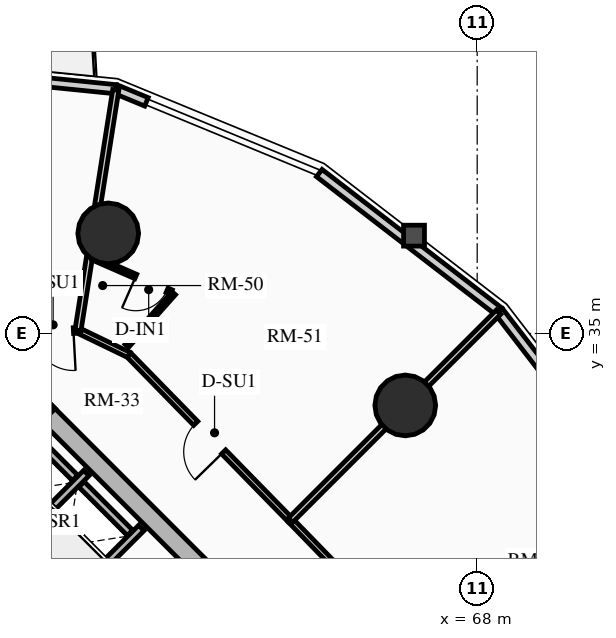
"""IFC4 building model, lengths in metres.
Left out: names, types, materials, properties, quantities, classifications, styles, units other than length and angle.
Written with IfcOpenShell. Run it as: python <this file> out.ifc"""

import sys

from ifc_helpers import new_model, si_unit, direction, frame, frame_2d, origin, origin_2d, place, context, subcontext, project, spatial, rectangle, circle, extrude, source, transform, mapped, element, fill, save


model = new_model("IFC4")
c1 = context("Model", 3, precision=1e-05, world=origin(), true_north=direction((0.0, 1.0)))
c2 = subcontext(c1, "Body", "Model", "MODEL_VIEW")
j1 = project(units=[si_unit("LENGTHUNIT", "METRE"), si_unit("PLANEANGLEUNIT", "RADIAN")], contexts=[c1])
p1 = place(None, origin())
s1 = spatial("IfcSite", under=j1, at=p1, CompositionType="ELEMENT")
p2 = place(p1, origin())
s2 = spatial("IfcBuilding", under=s1, at=p2, CompositionType="ELEMENT")
p3 = place(p2, frame((0.0, 0.0, 51.1)))
s3 = spatial("IfcBuildingStorey", under=s2, at=p3, CompositionType="ELEMENT", Elevation=51.1)
p4 = place(p3, frame((66.339, 23.227, 0.0), z_axis=(0.0, 0.0, 1.0), x_axis=(-0.707106781187, 0.707106781187, 0.0)))
e1 = element("IfcWall", 1, at=p4, inside=s3, PredefinedType="SHEAR", context=c2, shape_type="SweptSolid", body=[
    extrude(rectangle(XDim=14.3, YDim=0.5, at=frame_2d((7.15, 0.0))), origin(), (0.0, 0.0, 1.0), 2.91),
])
p5 = place(p3, frame((63.662, 20.904, 0.0), z_axis=(0.0, 0.0, 1.0), x_axis=(-0.707106781187, 0.707106781187, 0.0)))
e2 = element("IfcWall", 2, at=p5, inside=s3, PredefinedType="SHEAR", context=c2, shape_type="SweptSolid", body=[
    extrude(rectangle(XDim=13.8, YDim=0.35, at=frame_2d((6.9, 0.0))), origin(), (0.0, 0.0, 1.0), 2.91),
])
m1 = source(origin(), c2, "Body", "SweptSolid", [
    extrude(rectangle(XDim=1.1, YDim=2.015, at=frame_2d((0.55, 1.007))), frame((0.0, 0.185, 0.0), z_axis=(0.0, -1.0, 0.0), x_axis=(1.0, 0.0, 0.0)), (0.0, 0.0, 1.0), 0.37),
])
p6 = place(p5, frame((10.025, 0.0, 0.0)))
e3 = element("IfcOpeningElement", 3, at=p6, cuts=e2, PredefinedType="OPENING", context=c2, shape_type="MappedRepresentation", body=[
    mapped(m1, transform((0.0, 0.0, 0.0), x_axis=(1.0, 0.0, 0.0), y_axis=(0.0, 1.0, 0.0), z_axis=(0.0, 0.0, 1.0), scale=1.0)),
])
p7 = place(p5, frame((12.025, 0.0, 0.0)))
e4 = element("IfcOpeningElement", 4, at=p7, cuts=e2, PredefinedType="OPENING", context=c2, shape_type="MappedRepresentation", body=[
    mapped(m1, transform((0.0, 0.0, 0.0), x_axis=(1.0, 0.0, 0.0), y_axis=(0.0, 1.0, 0.0), z_axis=(0.0, 0.0, 1.0), scale=1.0)),
])
m2 = source(origin(), c2, "Body", "SweptSolid", [
    extrude(rectangle(XDim=1.15, YDim=2.02, at=frame_2d((0.575, 1.01))), frame((0.0, 0.185, 0.0), z_axis=(0.0, -1.0, 0.0), x_axis=(1.0, 0.0, 0.0)), (0.0, 0.0, 1.0), 0.37),
])
p8 = place(p5, frame((5.33, 0.0, 0.0)))
e5 = element("IfcOpeningElement", 5, at=p8, cuts=e2, PredefinedType="OPENING", context=c2, shape_type="MappedRepresentation", body=[
    mapped(m2, transform((0.0, 0.0, 0.0), x_axis=(1.0, 0.0, 0.0), y_axis=(0.0, 1.0, 0.0), z_axis=(0.0, 0.0, 1.0), scale=1.0)),
])
p9 = place(p3, frame((56.294, 33.024, 0.0), z_axis=(0.0, 0.0, 1.0), x_axis=(0.707106781187, 0.707106781187, 0.0)))
e6 = element("IfcColumn", 6, at=p9, inside=s3, PredefinedType="COLUMN", context=c2, shape_type="SweptSolid", body=[
    extrude(rectangle(XDim=0.85, YDim=0.85, at=origin_2d()), origin(), (0.0, 0.0, 1.0), 2.91),
])
for number, where, z_axis, x_axis in (
    (7, (66.107, 33.107, 0.0), (0.0, 0.0, 1.0), (1.0, 0.0, 0.0)),
    (8, (58.291, 37.635, 0.0), (0.0, 0.0, 1.0), (1.0, 0.0, 0.0)),
):
    element("IfcColumn", number, at=place(p3, frame(where, z_axis=z_axis, x_axis=x_axis)), inside=s3, PredefinedType="USERDEFINED", context=c2, shape_type="SweptSolid", body=[
        extrude(circle(Radius=0.8, at=origin_2d()), origin(), (0.0, 0.0, 1.0), 2.91),
    ])
p10 = place(p3, frame((63.844, 39.222, 0.0), z_axis=(0.0, 0.0, 1.0), x_axis=(0.792014314407, -0.610502519057, 0.0)))
e9 = element("IfcWall", 9, at=p10, inside=s3, PredefinedType="SOLIDWALL", context=c2, shape_type="SweptSolid", body=[
    extrude(rectangle(XDim=5.973, YDim=0.24, at=frame_2d((2.987, 0.0))), origin(), (0.0, 0.0, 1.0), 2.073),
])
p11 = place(p3, frame((58.493, 41.428, 0.0), z_axis=(0.0, 0.0, 1.0), x_axis=(0.924556017656, -0.381046152345, 0.0)))
e10 = element("IfcWall", 10, at=p11, inside=s3, PredefinedType="SOLIDWALL", context=c2, shape_type="SweptSolid", body=[
    extrude(rectangle(XDim=0.87, YDim=0.24, at=frame_2d((0.435, 0.0))), origin(), (0.0, 0.0, 1.0), 2.073),
])
p12 = place(p3, frame((53.043, 41.976, 0.0), z_axis=(0.0, 0.0, 1.0), x_axis=(0.994970765694, -0.100165739718, 0.0)))
e11 = element("IfcWall", 11, at=p12, inside=s3, PredefinedType="SOLIDWALL", context=c2, shape_type="SweptSolid", body=[
    extrude(rectangle(XDim=5.477, YDim=0.24, at=frame_2d((2.738, 0.0))), origin(), (0.0, 0.0, 1.0), 2.073),
])
m3 = source(origin(), c2, "Body", "SweptSolid", [
    extrude(rectangle(XDim=1.15, YDim=2.005, at=frame_2d((0.575, 1.002))), frame((0.0, 0.13, 0.0), z_axis=(0.0, -1.0, 0.0), x_axis=(1.0, 0.0, 0.0)), (0.0, 0.0, 1.0), 0.26),
])
p13 = place(p12, frame((2.163, 0.0, 0.0)))
e12 = element("IfcOpeningElement", 12, at=p13, cuts=e11, PredefinedType="OPENING", context=c2, shape_type="MappedRepresentation", body=[
    mapped(m3, transform((0.0, 0.0, 0.0), x_axis=(1.0, 0.0, 0.0), y_axis=(0.0, 1.0, 0.0), z_axis=(0.0, 0.0, 1.0), scale=1.0)),
])
p14 = place(p3, frame((68.575, 35.575, 0.0), z_axis=(0.0, 0.0, 1.0), x_axis=(0.610502519057, -0.792014314407, 0.0)))
e13 = element("IfcWall", 13, at=p14, inside=s3, PredefinedType="SOLIDWALL", context=c2, shape_type="SweptSolid", body=[
    extrude(rectangle(XDim=5.973, YDim=0.24, at=frame_2d((2.987, 0.0))), origin(), (0.0, 0.0, 1.0), 2.073),
])
m4 = source(origin(), c2, "Body", "SweptSolid", [
    extrude(rectangle(XDim=1.9, YDim=1.35, at=frame_2d((0.95, 0.675))), frame((0.0, 0.13, 0.0), z_axis=(0.0, -1.0, 0.0), x_axis=(1.0, 0.0, 0.0)), (0.0, 0.0, 1.0), 0.26),
])
p15 = place(p14, frame((2.037, 0.0, 0.65)))
e14 = element("IfcOpeningElement", 14, at=p15, cuts=e13, PredefinedType="OPENING", context=c2, shape_type="MappedRepresentation", body=[
    mapped(m4, transform((0.0, 0.0, 0.0), x_axis=(1.0, 0.0, 0.0), y_axis=(0.0, 1.0, 0.0), z_axis=(0.0, 0.0, 1.0), scale=1.0)),
])
p16 = place(p3, frame((57.062, 27.781, 0.0), z_axis=(0.0, 0.0, 1.0), x_axis=(0.707106781187, 0.707106781187, 0.0)))
e15 = element("IfcWall", 15, at=p16, inside=s3, PredefinedType="SHEAR", context=c2, shape_type="SweptSolid", body=[
    extrude(rectangle(XDim=2.97, YDim=0.2, at=frame_2d((1.485, 0.0))), origin(), (0.0, 0.0, 1.0), 2.91),
])
p17 = place(p3, frame((55.615, 29.227, 0.0), z_axis=(0.0, 0.0, 1.0), x_axis=(0.707147878904, 0.70706568108, 0.0)))
e16 = element("IfcWall", 16, at=p17, inside=s3, PredefinedType="SHEAR", context=c2, shape_type="SweptSolid", body=[
    extrude(rectangle(XDim=2.97, YDim=0.2, at=frame_2d((1.485, 0.0))), origin(), (0.0, 0.0, 1.0), 2.91),
])
p18 = place(p3, frame((58.865, 29.754, 0.0), z_axis=(0.0, 0.0, 1.0), x_axis=(-0.707174411312, 0.707039144592, 0.0)))
e17 = element("IfcWall", 17, at=p18, inside=s3, PredefinedType="SHEAR", context=c2, shape_type="SweptSolid", body=[
    extrude(rectangle(XDim=1.805, YDim=0.2, at=frame_2d((0.902, 0.0))), origin(), (0.0, 0.0, 1.0), 2.91),
])
p19 = place(p3, frame((57.419, 31.2, 0.0), z_axis=(0.0, 0.0, 1.0), x_axis=(-0.707032117043, 0.707181437447, 0.0)))
e18 = element("IfcWall", 18, at=p19, inside=s3, PredefinedType="SHEAR", context=c2, shape_type="SweptSolid", body=[
    extrude(rectangle(XDim=1.635, YDim=0.2, at=frame_2d((0.817, 0.0))), origin(), (0.0, 0.0, 1.0), 2.91),
])
p20 = place(p3, frame((63.086, 30.086, 0.0), z_axis=(0.0, 0.0, 1.0), x_axis=(-0.699032802832, 0.715089603172, 0.0)))
e19 = element("IfcWall", 19, at=p20, inside=s3, PredefinedType="PARTITIONING", context=c2, shape_type="SweptSolid", body=[
    extrude(rectangle(XDim=6.082, YDim=0.15, at=frame_2d((3.041, 0.0))), origin(), (0.0, 0.0, 1.0), 2.159),
])
m5 = source(origin(), c2, "Body", "SweptSolid", [
    extrude(rectangle(XDim=1.05, YDim=2.015, at=frame_2d((0.525, 1.007))), frame((0.0, 0.085, 0.0), z_axis=(0.0, -1.0, 0.0), x_axis=(1.0, 0.0, 0.0)), (0.0, 0.0, 1.0), 0.17),
])
p21 = place(p20, frame((2.516, 0.0, 0.0)))
e20 = element("IfcOpeningElement", 20, at=p21, cuts=e19, PredefinedType="OPENING", context=c2, shape_type="MappedRepresentation", body=[
    mapped(m5, transform((0.0, 0.0, 0.0), x_axis=(1.0, 0.0, 0.0), y_axis=(0.0, 1.0, 0.0), z_axis=(0.0, 0.0, 1.0), scale=1.0)),
])
p22 = place(p3, frame((58.835, 34.435, 0.0), z_axis=(0.0, 0.0, 1.0), x_axis=(-0.900352167336, 0.4351620098, 0.0)))
e21 = element("IfcWall", 21, at=p22, inside=s3, PredefinedType="PARTITIONING", context=c2, shape_type="SweptSolid", body=[
    extrude(rectangle(XDim=1.488, YDim=0.15, at=frame_2d((0.744, 0.0))), origin(), (0.0, 0.0, 1.0), 2.205),
])
p23 = place(p3, frame((57.495, 35.083, 0.0), z_axis=(0.0, 0.0, 1.0), x_axis=(-0.998536503254, -0.054081897798, 0.0)))
e22 = element("IfcWall", 22, at=p23, inside=s3, PredefinedType="PARTITIONING", context=c2, shape_type="SweptSolid", body=[
    extrude(rectangle(XDim=1.481, YDim=0.15, at=frame_2d((0.74, 0.0))), origin(), (0.0, 0.0, 1.0), 2.159),
])
p24 = place(p23, frame((0.12, 0.0, 0.0)))
e23 = element("IfcOpeningElement", 23, at=p24, cuts=e22, PredefinedType="OPENING", context=c2, shape_type="MappedRepresentation", body=[
    mapped(m5, transform((0.0, 0.0, 0.0), x_axis=(1.0, 0.0, 0.0), y_axis=(0.0, 1.0, 0.0), z_axis=(0.0, 0.0, 1.0), scale=1.0)),
])
p25 = place(p3, frame((67.247, 25.802, 0.0), z_axis=(0.0, 0.0, 1.0), x_axis=(-0.696771261687, 0.71729339108, 0.0)))
e24 = element("IfcWall", 24, at=p25, inside=s3, PredefinedType="PARTITIONING", context=c2, shape_type="SweptSolid", body=[
    extrude(rectangle(XDim=5.972, YDim=0.15, at=frame_2d((2.986, 0.0))), origin(), (0.0, 0.0, 1.0), 2.635),
])
m6 = source(origin(), c2, "Body", "SweptSolid", [
    extrude(rectangle(XDim=1.0, YDim=2.015, at=frame_2d((0.5, 1.007))), frame((0.0, 0.085, 0.0), z_axis=(0.0, -1.0, 0.0), x_axis=(1.0, 0.0, 0.0)), (0.0, 0.0, 1.0), 0.17),
])
p26 = place(p25, frame((2.486, 0.0, 0.0)))
e25 = element("IfcOpeningElement", 25, at=p26, cuts=e24, PredefinedType="OPENING", context=c2, shape_type="MappedRepresentation", body=[
    mapped(m6, transform((0.0, 0.0, 0.0), x_axis=(1.0, 0.0, 0.0), y_axis=(0.0, 1.0, 0.0), z_axis=(0.0, 0.0, 1.0), scale=1.0)),
])
p27 = place(p3, frame((63.086, 30.086, 0.0), z_axis=(0.0, 0.0, 1.0), x_axis=(0.707106781187, 0.707106781187, 0.0)))
e26 = element("IfcWall", 26, at=p27, inside=s3, PredefinedType="PARTITIONING", context=c2, shape_type="SweptSolid", body=[
    extrude(rectangle(XDim=7.743, YDim=0.16, at=frame_2d((3.872, 0.0))), origin(), (0.0, 0.0, 1.0), 2.073),
])
p28 = place(p3, frame((57.495, 35.083, 0.0), z_axis=(0.0, 0.0, 1.0), x_axis=(0.155296837382, 0.987867851638, 0.0)))
e27 = element("IfcWall", 27, at=p28, inside=s3, PredefinedType="PARTITIONING", context=c2, shape_type="SweptSolid", body=[
    extrude(rectangle(XDim=6.403, YDim=0.16, at=frame_2d((3.202, 0.0))), origin(), (0.0, 0.0, 1.0), 2.073),
])
p29 = place(p3, frame((58.78, 34.676, 0.0), z_axis=(0.0, 0.0, 1.0), x_axis=(0.6649433297, 0.746893813261, 0.0)))
e28 = element("IfcWall", 28, at=p29, inside=s3, PredefinedType="PARTITIONING", context=c2, shape_type="SweptSolid", body=[
    extrude(rectangle(XDim=1.856, YDim=0.125, at=frame_2d((0.928, 0.0))), origin(), (0.0, 0.0, 1.0), 2.205),
])
p30 = place(p3, frame((59.95, 36.09, 0.0), z_axis=(0.0, 0.0, 1.0), x_axis=(-0.916037613906, 0.401092370795, 0.0)))
e29 = element("IfcWall", 29, at=p30, inside=s3, PredefinedType="PARTITIONING", context=c2, shape_type="SweptSolid", body=[
    extrude(rectangle(XDim=2.247, YDim=0.125, at=frame_2d((1.124, 0.0))), origin(), (0.0, 0.0, 1.0), 2.159),
])
m7 = source(origin(), c2, "Body", "SweptSolid", [
    extrude(rectangle(XDim=0.9, YDim=2.005, at=frame_2d((0.45, 1.002))), frame((0.0, 0.073, 0.0), z_axis=(0.0, -1.0, 0.0), x_axis=(1.0, 0.0, 0.0)), (0.0, 0.0, 1.0), 0.145),
])
p31 = place(p30, frame((0.12, 0.0, 0.0)))
e30 = element("IfcOpeningElement", 30, at=p31, cuts=e29, PredefinedType="OPENING", context=c2, shape_type="MappedRepresentation", body=[
    mapped(m7, transform((0.0, 0.0, 0.0), x_axis=(1.0, 0.0, 0.0), y_axis=(0.0, 1.0, 0.0), z_axis=(0.0, 0.0, 1.0), scale=1.0)),
])
m8 = source(origin(), c2, "Body", "SweptSolid", [
    extrude(rectangle(XDim=1.05, YDim=2.015, at=frame_2d((0.525, 1.007))), frame((0.0, 0.025, 0.0), z_axis=(0.0, -1.0, 0.0), x_axis=(1.0, 0.0, 0.0)), (0.0, 0.0, 1.0), 0.05),
])
p32 = place(p24, origin())
e31 = element("IfcDoor", 31, at=p32, inside=s3, OperationType="SINGLE_SWING_LEFT", PredefinedType="DOOR", context=c2, shape_type="MappedRepresentation", body=[
    mapped(m8, transform((0.0, 0.0, 0.0), x_axis=(1.0, 0.0, 0.0), y_axis=(0.0, 1.0, 0.0), z_axis=(0.0, 0.0, 1.0), scale=1.0)),
])
fill(e23, e31)
p33 = place(p21, origin())
e32 = element("IfcDoor", 32, at=p33, inside=s3, OperationType="SINGLE_SWING_LEFT", PredefinedType="DOOR", context=c2, shape_type="MappedRepresentation", body=[
    mapped(m8, transform((0.0, 0.0, 0.0), x_axis=(1.0, 0.0, 0.0), y_axis=(0.0, 1.0, 0.0), z_axis=(0.0, 0.0, 1.0), scale=1.0)),
])
fill(e20, e32)
m9 = source(origin(), c2, "Body", "SweptSolid", [
    extrude(rectangle(XDim=0.9, YDim=2.005, at=frame_2d((0.45, 1.002))), frame((0.0, 0.025, 0.0), z_axis=(0.0, -1.0, 0.0), x_axis=(1.0, 0.0, 0.0)), (0.0, 0.0, 1.0), 0.05),
])
p34 = place(p31, origin())
e33 = element("IfcDoor", 33, at=p34, inside=s3, OperationType="SINGLE_SWING_RIGHT", PredefinedType="DOOR", context=c2, shape_type="MappedRepresentation", body=[
    mapped(m9, transform((0.0, 0.0, 0.0), x_axis=(1.0, 0.0, 0.0), y_axis=(0.0, 1.0, 0.0), z_axis=(0.0, 0.0, 1.0), scale=1.0)),
])
fill(e30, e33)
save(model, sys.argv[1])
